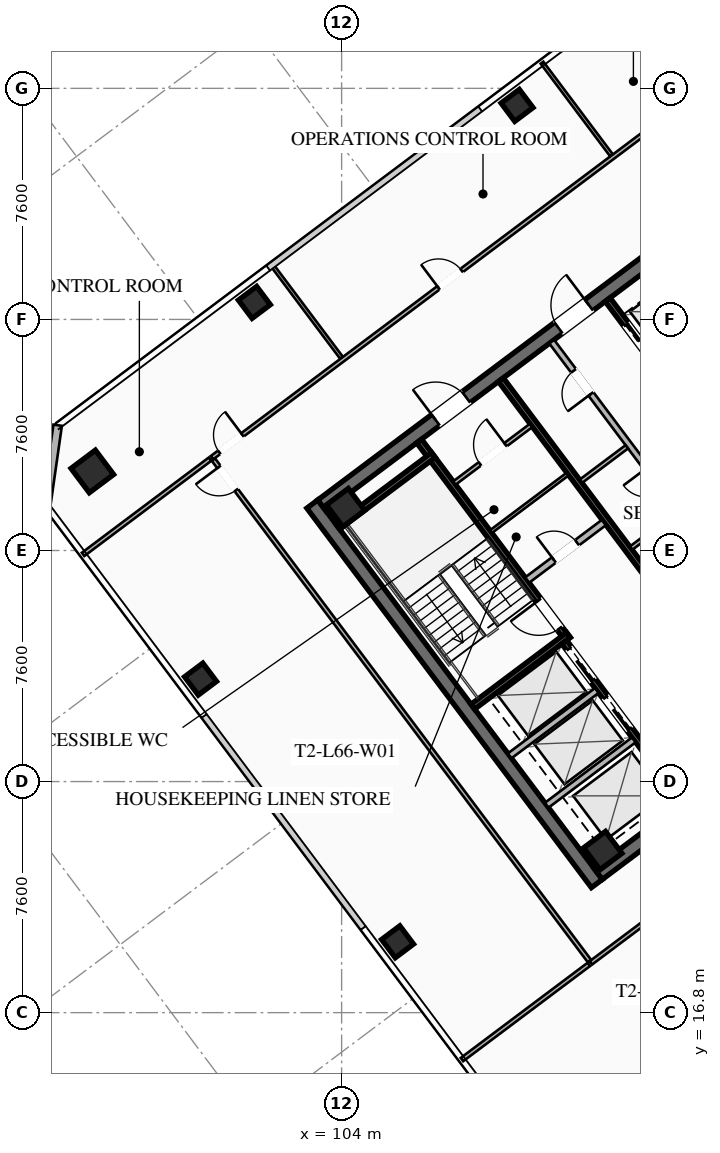
"""IFC4 building model, lengths in metres.
Left out: names, types, materials, properties, quantities, classifications, styles, units other than length and angle.
Written with IfcOpenShell. Run it as: python <this file> out.ifc"""

import sys

from ifc_helpers import new_model, si_unit, direction, frame, frame_2d, origin, origin_2d, place, context, subcontext, project, spatial, rectangle, hollow_rectangle, extrude, element, fill, save


model = new_model("IFC4")
c1 = context("Model", 3, precision=1e-05, world=origin(), true_north=direction((0.0, 1.0)))
c2 = subcontext(c1, "Body", "Model", "MODEL_VIEW")
j1 = project(units=[si_unit("LENGTHUNIT", "METRE"), si_unit("PLANEANGLEUNIT", "RADIAN")], contexts=[c1])
p1 = place(None, origin())
s1 = spatial("IfcSite", under=j1, at=p1, CompositionType="ELEMENT")
p2 = place(p1, origin())
s2 = spatial("IfcBuilding", under=s1, at=p2, CompositionType="ELEMENT")
p3 = place(p2, frame((0.0, 0.0, 243.25)))
s3 = spatial("IfcBuildingStorey", under=s2, at=p3, CompositionType="ELEMENT", Elevation=243.25)
p4 = place(p3, frame((112.396, 21.047, 0.0), z_axis=(0.0, 0.0, 1.0), x_axis=(-0.600005007985, 0.799996243986, 0.0)))
e1 = element("IfcWall", 1, at=p4, inside=s3, PredefinedType="SHEAR", context=c2, shape_type="SweptSolid", body=[
    extrude(rectangle(XDim=15.6, YDim=0.45, at=frame_2d((7.8, 0.0))), origin(), (0.0, 0.0, 1.0), 3.55),
])
p5 = place(p3, frame((124.649, 30.518, 0.0), z_axis=(0.0, 0.0, 1.0), x_axis=(-0.8, -0.6, 0.0)))
e2 = element("IfcWall", 2, at=p5, inside=s3, PredefinedType="SHEAR", context=c2, shape_type="SweptSolid", body=[
    extrude(rectangle(XDim=15.26, YDim=0.45, at=frame_2d((7.63, 0.0))), origin(), (0.0, 0.0, 1.0), 3.55),
])
p6 = place(p5, frame((9.33, 0.0, 0.0)))
e3 = element("IfcOpeningElement", 3, at=p6, cuts=e2, PredefinedType="OPENING", context=c2, shape_type="SweptSolid", body=[
    extrude(rectangle(XDim=1.25, YDim=2.25, at=frame_2d((0.625, 1.125))), frame((0.0, 0.235, 0.0), z_axis=(0.0, -1.0, 0.0), x_axis=(1.0, 0.0, 0.0)), (0.0, 0.0, 1.0), 0.47),
])
p7 = place(p5, frame((4.28, 0.0, 0.0)))
e4 = element("IfcOpeningElement", 4, at=p7, cuts=e2, PredefinedType="OPENING", context=c2, shape_type="SweptSolid", body=[
    extrude(rectangle(XDim=1.25, YDim=2.25, at=frame_2d((0.625, 1.125))), frame((0.0, 0.235, 0.0), z_axis=(0.0, -1.0, 0.0), x_axis=(1.0, 0.0, 0.0)), (0.0, 0.0, 1.0), 0.47),
])
p8 = place(p3, frame((103.351, 33.482, 0.0), z_axis=(0.0, 0.0, 1.0), x_axis=(0.8, 0.6, 0.0)))
e5 = element("IfcWall", 5, at=p8, inside=s3, PredefinedType="SHEAR", context=c2, shape_type="SweptSolid", body=[
    extrude(rectangle(XDim=15.26, YDim=0.45, at=frame_2d((7.63, 0.0))), origin(), (0.0, 0.0, 1.0), 3.55),
])
p9 = place(p8, frame((4.68, 0.0, 0.0)))
e6 = element("IfcOpeningElement", 6, at=p9, cuts=e5, PredefinedType="OPENING", context=c2, shape_type="SweptSolid", body=[
    extrude(rectangle(XDim=1.25, YDim=2.25, at=frame_2d((0.625, 1.125))), frame((0.0, 0.235, 0.0), z_axis=(0.0, -1.0, 0.0), x_axis=(1.0, 0.0, 0.0)), (0.0, 0.0, 1.0), 0.47),
])
p10 = place(p8, frame((9.73, 0.0, 0.0)))
e7 = element("IfcOpeningElement", 7, at=p10, cuts=e5, PredefinedType="OPENING", context=c2, shape_type="SweptSolid", body=[
    extrude(rectangle(XDim=1.25, YDim=2.25, at=frame_2d((0.625, 1.125))), frame((0.0, 0.235, 0.0), z_axis=(0.0, -1.0, 0.0), x_axis=(1.0, 0.0, 0.0)), (0.0, 0.0, 1.0), 0.47),
])
for number, where, z_axis, x_axis in (
    (8, (112.59, 22.13, 0.0), (0.0, 0.0, 1.0), (0.8, 0.6, 0.0)),
    (9, (104.13, 33.41, 0.0), (0.0, 0.0, 1.0), (0.8, 0.6, 0.0)),
):
    element("IfcColumn", number, at=place(p3, frame(where, z_axis=z_axis, x_axis=x_axis)), inside=s3, PredefinedType="COLUMN", context=c2, shape_type="SweptSolid", body=[
        extrude(hollow_rectangle(XDim=0.9, YDim=0.9, WallThickness=0.04, at=origin_2d()), origin(), (0.0, 0.0, 1.0), 3.25),
    ])
p11 = place(p3, frame((95.8, 34.6, 0.0), z_axis=(0.0, 0.0, 1.0), x_axis=(0.799999996291, 0.600000004945, 0.0)))
e10 = element("IfcColumn", 10, at=p11, inside=s3, PredefinedType="COLUMN", context=c2, shape_type="SweptSolid", body=[
    extrude(hollow_rectangle(XDim=1.0, YDim=1.0, WallThickness=0.04, at=origin_2d()), origin(), (0.0, 0.0, 1.0), 3.25),
])
for number, where, z_axis, x_axis in (
    (11, (109.77, 46.64, 0.0), (0.0, 0.0, 1.0), (0.8, 0.6, 0.0)),
    (12, (101.13, 40.16, 0.0), (0.0, 0.0, 1.0), (0.8, 0.6, 0.0)),
    (13, (99.36, 27.77, 0.0), (0.0, 0.0, 1.0), (0.8, 0.6, 0.0)),
    (14, (105.84, 19.13, 0.0), (0.0, 0.0, 1.0), (0.8, 0.6, 0.0)),
):
    element("IfcColumn", number, at=place(p3, frame(where, z_axis=z_axis, x_axis=x_axis)), inside=s3, PredefinedType="COLUMN", context=c2, shape_type="SweptSolid", body=[
        extrude(hollow_rectangle(XDim=0.75, YDim=0.75, WallThickness=0.032, at=origin_2d()), origin(), (0.0, 0.0, 1.0), 3.25),
    ])
p12 = place(p3, frame((94.28, 33.46, 0.0), z_axis=(0.0, 0.0, 1.0), x_axis=(0.141370477216, 0.989956760759, 0.0)))
e15 = element("IfcWall", 15, at=p12, inside=s3, PredefinedType="SOLIDWALL", context=c2, shape_type="SweptSolid", body=[
    extrude(rectangle(XDim=2.687, YDim=0.28, at=frame_2d((1.344, 0.0))), origin(), (0.0, 0.0, 1.0), 3.25),
])
p13 = place(p3, frame((111.44, 29.08, 0.0), z_axis=(0.0, 0.0, 1.0), x_axis=(-0.59999041401, 0.800007189403, 0.0)))
e16 = element("IfcWall", 16, at=p13, inside=s3, PredefinedType="SHEAR", context=c2, shape_type="SweptSolid", body=[
    extrude(rectangle(XDim=8.15, YDim=0.2, at=frame_2d((4.075, 0.0))), origin(), (0.0, 0.0, 1.0), 3.25),
])
p14 = place(p13, frame((0.45, 0.0, 0.0)))
e17 = element("IfcOpeningElement", 17, at=p14, cuts=e16, PredefinedType="OPENING", context=c2, shape_type="SweptSolid", body=[
    extrude(rectangle(XDim=1.15, YDim=2.2, at=frame_2d((0.575, 1.1))), frame((0.0, 0.11, 0.0), z_axis=(0.0, -1.0, 0.0), x_axis=(1.0, 0.0, 0.0)), (0.0, 0.0, 1.0), 0.22),
])
for number, where, z_axis, x_axis in (
    (18, (108.316, 26.862, 0.0), (0.0, 0.0, 1.0), (0.8, 0.6, 0.0)),
    (19, (103.876, 32.782, 0.0), (0.0, 0.0, 1.0), (0.8, 0.6, 0.0)),
):
    element("IfcWall", number, at=place(p3, frame(where, z_axis=z_axis, x_axis=x_axis)), inside=s3, PredefinedType="SHEAR", context=c2, shape_type="SweptSolid", body=[
        extrude(rectangle(XDim=3.93, YDim=0.2, at=frame_2d((1.965, 0.0))), origin(), (0.0, 0.0, 1.0), 3.25),
    ])
p15 = place(p3, frame((118.058, 25.856, 0.0), z_axis=(0.0, 0.0, 1.0), x_axis=(-0.600002657301, 0.799998007018, 0.0)))
e20 = element("IfcWall", 20, at=p15, inside=s3, PredefinedType="SHEAR", context=c2, shape_type="SweptSolid", body=[
    extrude(rectangle(XDim=14.7, YDim=0.2, at=frame_2d((7.35, 0.0))), origin(), (0.0, 0.0, 1.0), 3.25),
])
p16 = place(p3, frame((110.104, 31.028, 0.0), z_axis=(0.0, 0.0, 1.0), x_axis=(0.800018601094, 0.59997519774, 0.0)))
e21 = element("IfcWall", 21, at=p16, inside=s3, PredefinedType="SOLIDWALL", context=c2, shape_type="SweptSolid", body=[
    extrude(rectangle(XDim=3.15, YDim=0.22, at=frame_2d((1.575, 0.0))), origin(), (0.0, 0.0, 1.0), 2.393),
])
p17 = place(p16, frame((1.1, 0.0, 0.0)))
e22 = element("IfcOpeningElement", 22, at=p17, cuts=e21, PredefinedType="OPENING", context=c2, shape_type="SweptSolid", body=[
    extrude(rectangle(XDim=0.95, YDim=2.05, at=frame_2d((0.475, 1.025))), frame((0.0, 0.12, 0.0), z_axis=(0.0, -1.0, 0.0), x_axis=(1.0, 0.0, 0.0)), (0.0, 0.0, 1.0), 0.24),
])
p18 = place(p3, frame((115.25, 23.75, 0.0), z_axis=(0.0, 0.0, 1.0), x_axis=(-0.599994036198, 0.800004472816, 0.0)))
e23 = element("IfcWall", 23, at=p18, inside=s3, PredefinedType="SHEAR", context=c2, shape_type="SweptSolid", body=[
    extrude(rectangle(XDim=6.55, YDim=0.2, at=frame_2d((3.275, 0.0))), origin(), (0.0, 0.0, 1.0), 3.25),
])
p19 = place(p18, frame((4.975, 0.0, 0.0)))
e24 = element("IfcOpeningElement", 24, at=p19, cuts=e23, PredefinedType="OPENING", context=c2, shape_type="SweptSolid", body=[
    extrude(rectangle(XDim=1.3, YDim=2.25, at=frame_2d((0.65, 1.125))), frame((0.0, 0.11, 0.0), z_axis=(0.0, -1.0, 0.0), x_axis=(1.0, 0.0, 0.0)), (0.0, 0.0, 1.0), 0.22),
])
p20 = place(p18, frame((2.975, 0.0, 0.0)))
e25 = element("IfcOpeningElement", 25, at=p20, cuts=e23, PredefinedType="OPENING", context=c2, shape_type="SweptSolid", body=[
    extrude(rectangle(XDim=1.3, YDim=2.25, at=frame_2d((0.65, 1.125))), frame((0.0, 0.11, 0.0), z_axis=(0.0, -1.0, 0.0), x_axis=(1.0, 0.0, 0.0)), (0.0, 0.0, 1.0), 0.22),
])
p21 = place(p18, frame((0.775, 0.0, 0.0)))
e26 = element("IfcOpeningElement", 26, at=p21, cuts=e23, PredefinedType="OPENING", context=c2, shape_type="SweptSolid", body=[
    extrude(rectangle(XDim=1.3, YDim=2.25, at=frame_2d((0.65, 1.125))), frame((0.0, 0.11, 0.0), z_axis=(0.0, -1.0, 0.0), x_axis=(1.0, 0.0, 0.0)), (0.0, 0.0, 1.0), 0.22),
])
for number, where, z_axis, x_axis in (
    (27, (110.746, 23.622, 0.0), (0.0, 0.0, 1.0), (0.8, 0.6, 0.0)),
    (28, (109.528, 25.246, 0.0), (0.0, 0.0, 1.0), (0.8, 0.6, 0.0)),
):
    element("IfcWall", number, at=place(p3, frame(where, z_axis=z_axis, x_axis=x_axis)), inside=s3, PredefinedType="SOLIDWALL", context=c2, shape_type="SweptSolid", body=[
        extrude(rectangle(XDim=3.58, YDim=0.2, at=frame_2d((1.79, 0.0))), origin(), (0.0, 0.0, 1.0), 3.25),
    ])
p22 = place(p3, frame((112.75, 40.25, 0.0), z_axis=(0.0, 0.0, 1.0), x_axis=(0.599994036198, -0.800004472816, 0.0)))
e29 = element("IfcWall", 29, at=p22, inside=s3, PredefinedType="SHEAR", context=c2, shape_type="SweptSolid", body=[
    extrude(rectangle(XDim=6.55, YDim=0.2, at=frame_2d((3.275, 0.0))), origin(), (0.0, 0.0, 1.0), 3.25),
])
p23 = place(p22, frame((5.075, 0.0, 0.0)))
e30 = element("IfcOpeningElement", 30, at=p23, cuts=e29, PredefinedType="OPENING", context=c2, shape_type="SweptSolid", body=[
    extrude(rectangle(XDim=1.1, YDim=2.2, at=frame_2d((0.55, 1.1))), frame((0.0, 0.11, 0.0), z_axis=(0.0, -1.0, 0.0), x_axis=(1.0, 0.0, 0.0)), (0.0, 0.0, 1.0), 0.22),
])
p24 = place(p22, frame((3.025, 0.0, 0.0)))
e31 = element("IfcOpeningElement", 31, at=p24, cuts=e29, PredefinedType="OPENING", context=c2, shape_type="SweptSolid", body=[
    extrude(rectangle(XDim=1.1, YDim=2.2, at=frame_2d((0.55, 1.1))), frame((0.0, 0.11, 0.0), z_axis=(0.0, -1.0, 0.0), x_axis=(1.0, 0.0, 0.0)), (0.0, 0.0, 1.0), 0.22),
])
p25 = place(p22, frame((1.025, 0.0, 0.0)))
e32 = element("IfcOpeningElement", 32, at=p25, cuts=e29, PredefinedType="OPENING", context=c2, shape_type="SweptSolid", body=[
    extrude(rectangle(XDim=1.1, YDim=2.2, at=frame_2d((0.55, 1.1))), frame((0.0, 0.11, 0.0), z_axis=(0.0, -1.0, 0.0), x_axis=(1.0, 0.0, 0.0)), (0.0, 0.0, 1.0), 0.22),
])
p26 = place(p3, frame((107.71, 34.22, 0.0), z_axis=(0.0, 0.0, 1.0), x_axis=(0.799981399002, 0.60002480053, 0.0)))
e33 = element("IfcWall", 33, at=p26, inside=s3, PredefinedType="PARTITIONING", context=c2, shape_type="SweptSolid", body=[
    extrude(rectangle(XDim=3.15, YDim=0.135, at=frame_2d((1.575, 0.0))), origin(), (0.0, 0.0, 1.0), 2.393),
])
p27 = place(p26, frame((1.05, 0.0, 0.0)))
e34 = element("IfcOpeningElement", 34, at=p27, cuts=e33, PredefinedType="OPENING", context=c2, shape_type="SweptSolid", body=[
    extrude(rectangle(XDim=1.05, YDim=2.2, at=frame_2d((0.525, 1.1))), frame((0.0, 0.077, 0.0), z_axis=(0.0, -1.0, 0.0), x_axis=(1.0, 0.0, 0.0)), (0.0, 0.0, 1.0), 0.155),
])
p28 = place(p3, frame((108.91, 32.62, 0.0), z_axis=(0.0, 0.0, 1.0), x_axis=(0.800018601094, 0.59997519774, 0.0)))
e35 = element("IfcWall", 35, at=p28, inside=s3, PredefinedType="PARTITIONING", context=c2, shape_type="SweptSolid", body=[
    extrude(rectangle(XDim=3.15, YDim=0.11, at=frame_2d((1.575, 0.0))), origin(), (0.0, 0.0, 1.0), 2.393),
])
p29 = place(p3, frame((115.11, 33.27, 0.0), z_axis=(0.0, 0.0, 1.0), x_axis=(-0.600011160345, 0.79999162962, 0.0)))
e36 = element("IfcWall", 36, at=p29, inside=s3, PredefinedType="SOLIDWALL", context=c2, shape_type="SweptSolid", body=[
    extrude(rectangle(XDim=7.0, YDim=0.2, at=frame_2d((3.5, 0.0))), origin(), (0.0, 0.0, 1.0), 2.393),
])
p30 = place(p29, frame((0.85, 0.0, 0.0)))
e37 = element("IfcOpeningElement", 37, at=p30, cuts=e36, PredefinedType="OPENING", context=c2, shape_type="SweptSolid", body=[
    extrude(rectangle(XDim=0.95, YDim=2.05, at=frame_2d((0.475, 1.025))), frame((0.0, 0.11, 0.0), z_axis=(0.0, -1.0, 0.0), x_axis=(1.0, 0.0, 0.0)), (0.0, 0.0, 1.0), 0.22),
])
p31 = place(p29, frame((4.85, 0.0, 0.0)))
e38 = element("IfcOpeningElement", 38, at=p31, cuts=e36, PredefinedType="OPENING", context=c2, shape_type="SweptSolid", body=[
    extrude(rectangle(XDim=0.95, YDim=2.05, at=frame_2d((0.475, 1.025))), frame((0.0, 0.11, 0.0), z_axis=(0.0, -1.0, 0.0), x_axis=(1.0, 0.0, 0.0)), (0.0, 0.0, 1.0), 0.22),
])
p32 = place(p3, frame((113.526, 32.082, 0.0), z_axis=(0.0, 0.0, 1.0), x_axis=(0.800046745961, 0.599937666993, 0.0)))
e39 = element("IfcWall", 39, at=p32, inside=s3, PredefinedType="PARTITIONING", context=c2, shape_type="SweptSolid", body=[
    extrude(rectangle(XDim=1.88, YDim=0.135, at=frame_2d((0.94, 0.0))), origin(), (0.0, 0.0, 1.0), 2.393),
])
p33 = place(p3, frame((111.876, 34.282, 0.0), z_axis=(0.0, 0.0, 1.0), x_axis=(0.8, 0.6, 0.0)))
e40 = element("IfcWall", 40, at=p33, inside=s3, PredefinedType="PARTITIONING", context=c2, shape_type="SweptSolid", body=[
    extrude(rectangle(XDim=1.88, YDim=0.135, at=frame_2d((0.94, 0.0))), origin(), (0.0, 0.0, 1.0), 2.393),
])
p34 = place(p3, frame((99.736, 35.052, 0.0), z_axis=(0.0, 0.0, 1.0), x_axis=(0.799997387685, 0.600003483071, 0.0)))
e41 = element("IfcWall", 41, at=p34, inside=s3, PredefinedType="PARTITIONING", context=c2, shape_type="SweptSolid", body=[
    extrude(rectangle(XDim=22.43, YDim=0.135, at=frame_2d((11.215, 0.0))), origin(), (0.0, 0.0, 1.0), 2.393),
])
p35 = place(p34, frame((0.3, 0.0, 0.0)))
e42 = element("IfcOpeningElement", 42, at=p35, cuts=e41, PredefinedType="OPENING", context=c2, shape_type="SweptSolid", body=[
    extrude(rectangle(XDim=0.95, YDim=2.05, at=frame_2d((0.475, 1.025))), frame((0.0, 0.077, 0.0), z_axis=(0.0, -1.0, 0.0), x_axis=(1.0, 0.0, 0.0)), (0.0, 0.0, 1.0), 0.155),
])
p36 = place(p34, frame((9.313, 0.0, 0.0)))
e43 = element("IfcOpeningElement", 43, at=p36, cuts=e41, PredefinedType="OPENING", context=c2, shape_type="SweptSolid", body=[
    extrude(rectangle(XDim=0.95, YDim=2.05, at=frame_2d((0.475, 1.025))), frame((0.0, 0.077, 0.0), z_axis=(0.0, -1.0, 0.0), x_axis=(1.0, 0.0, 0.0)), (0.0, 0.0, 1.0), 0.155),
])
p37 = place(p34, frame((21.18, 0.0, 0.0)))
e44 = element("IfcOpeningElement", 44, at=p37, cuts=e41, PredefinedType="OPENING", context=c2, shape_type="SweptSolid", body=[
    extrude(rectangle(XDim=0.95, YDim=2.05, at=frame_2d((0.475, 1.025))), frame((0.0, 0.077, 0.0), z_axis=(0.0, -1.0, 0.0), x_axis=(1.0, 0.0, 0.0)), (0.0, 0.0, 1.0), 0.155),
])
for number, where, z_axis, x_axis in (
    (45, (103.992, 38.344, 0.0), (0.0, 0.0, 1.0), (-0.6, 0.8, 0.0)),
    (46, (112.872, 45.004, 0.0), (0.0, 0.0, 1.0), (-0.6, 0.8, 0.0)),
):
    element("IfcWall", number, at=place(p3, frame(where, z_axis=z_axis, x_axis=x_axis)), inside=s3, PredefinedType="PARTITIONING", context=c2, shape_type="SweptSolid", body=[
        extrude(rectangle(XDim=3.8, YDim=0.11, at=frame_2d((1.9, 0.0))), origin(), (0.0, 0.0, 1.0), 2.393),
    ])
p38 = place(p3, frame((123.382, 26.824, 0.0), z_axis=(0.0, 0.0, 1.0), x_axis=(-0.800004191227, -0.599994411657, 0.0)))
e47 = element("IfcWall", 47, at=p38, inside=s3, PredefinedType="PARTITIONING", context=c2, shape_type="SweptSolid", body=[
    extrude(rectangle(XDim=13.98, YDim=0.135, at=frame_2d((6.99, 0.0))), origin(), (0.0, 0.0, 1.0), 2.393),
])
p39 = place(p38, frame((7.701, 0.0, 0.0)))
e48 = element("IfcOpeningElement", 48, at=p39, cuts=e47, PredefinedType="OPENING", context=c2, shape_type="SweptSolid", body=[
    extrude(rectangle(XDim=0.95, YDim=2.05, at=frame_2d((0.475, 1.025))), frame((0.0, 0.077, 0.0), z_axis=(0.0, -1.0, 0.0), x_axis=(1.0, 0.0, 0.0)), (0.0, 0.0, 1.0), 0.155),
])
p40 = place(p38, frame((3.688, 0.0, 0.0)))
e49 = element("IfcOpeningElement", 49, at=p40, cuts=e47, PredefinedType="OPENING", context=c2, shape_type="SweptSolid", body=[
    extrude(rectangle(XDim=0.95, YDim=2.05, at=frame_2d((0.475, 1.025))), frame((0.0, 0.077, 0.0), z_axis=(0.0, -1.0, 0.0), x_axis=(1.0, 0.0, 0.0)), (0.0, 0.0, 1.0), 0.155),
])
p41 = place(p3, frame((112.15, 18.5, 0.0), z_axis=(0.0, 0.0, 1.0), x_axis=(-0.599998104681, 0.800001421485, 0.0)))
e50 = element("IfcWall", 50, at=p41, inside=s3, PredefinedType="PARTITIONING", context=c2, shape_type="SweptSolid", body=[
    extrude(rectangle(XDim=20.61, YDim=0.135, at=frame_2d((10.305, 0.0))), origin(), (0.0, 0.0, 1.0), 2.393),
])
p42 = place(p41, frame((19.36, 0.0, 0.0)))
e51 = element("IfcOpeningElement", 51, at=p42, cuts=e50, PredefinedType="OPENING", context=c2, shape_type="SweptSolid", body=[
    extrude(rectangle(XDim=0.95, YDim=2.05, at=frame_2d((0.475, 1.025))), frame((0.0, 0.077, 0.0), z_axis=(0.0, -1.0, 0.0), x_axis=(1.0, 0.0, 0.0)), (0.0, 0.0, 1.0), 0.155),
])
for number, where, z_axis, x_axis in (
    (52, (99.672, 35.004, 0.0), (0.0, 0.0, 1.0), (-0.8, -0.6, 0.0)),
    (53, (107.958, 15.256, 0.0), (0.0, 0.0, 1.0), (0.8, 0.6, 0.0)),
):
    element("IfcWall", number, at=place(p3, frame(where, z_axis=z_axis, x_axis=x_axis)), inside=s3, PredefinedType="PARTITIONING", context=c2, shape_type="SweptSolid", body=[
        extrude(rectangle(XDim=5.22, YDim=0.135, at=frame_2d((2.61, 0.0))), origin(), (0.0, 0.0, 1.0), 2.393),
    ])
p43 = place(p9, origin())
e54 = element("IfcDoor", 54, at=p43, inside=s3, OperationType="SINGLE_SWING_LEFT", PredefinedType="DOOR", context=c2, shape_type="SweptSolid", body=[
    extrude(rectangle(XDim=1.25, YDim=2.25, at=frame_2d((0.625, 1.125))), frame((0.0, 0.025, 0.0), z_axis=(0.0, -1.0, 0.0), x_axis=(1.0, 0.0, 0.0)), (0.0, 0.0, 1.0), 0.05),
])
fill(e6, e54)
p44 = place(p10, origin())
e55 = element("IfcDoor", 55, at=p44, inside=s3, OperationType="SINGLE_SWING_RIGHT", PredefinedType="DOOR", context=c2, shape_type="SweptSolid", body=[
    extrude(rectangle(XDim=1.25, YDim=2.25, at=frame_2d((0.625, 1.125))), frame((0.0, 0.025, 0.0), z_axis=(0.0, -1.0, 0.0), x_axis=(1.0, 0.0, 0.0)), (0.0, 0.0, 1.0), 0.05),
])
fill(e7, e55)
p45 = place(p14, origin())
e56 = element("IfcDoor", 56, at=p45, inside=s3, OperationType="SINGLE_SWING_RIGHT", PredefinedType="DOOR", context=c2, shape_type="SweptSolid", body=[
    extrude(rectangle(XDim=1.15, YDim=2.2, at=frame_2d((0.575, 1.1))), frame((0.0, 0.025, 0.0), z_axis=(0.0, -1.0, 0.0), x_axis=(1.0, 0.0, 0.0)), (0.0, 0.0, 1.0), 0.05),
])
fill(e17, e56)
p46 = place(p27, origin())
e57 = element("IfcDoor", 57, at=p46, inside=s3, OperationType="SINGLE_SWING_RIGHT", PredefinedType="DOOR", context=c2, shape_type="SweptSolid", body=[
    extrude(rectangle(XDim=1.05, YDim=2.2, at=frame_2d((0.525, 1.1))), frame((0.0, 0.025, 0.0), z_axis=(0.0, -1.0, 0.0), x_axis=(1.0, 0.0, 0.0)), (0.0, 0.0, 1.0), 0.05),
])
fill(e34, e57)
p47 = place(p17, origin())
e58 = element("IfcDoor", 58, at=p47, inside=s3, OperationType="SINGLE_SWING_LEFT", PredefinedType="DOOR", context=c2, shape_type="SweptSolid", body=[
    extrude(rectangle(XDim=0.95, YDim=2.05, at=frame_2d((0.475, 1.025))), frame((0.0, 0.025, 0.0), z_axis=(0.0, -1.0, 0.0), x_axis=(1.0, 0.0, 0.0)), (0.0, 0.0, 1.0), 0.05),
])
fill(e22, e58)
p48 = place(p31, origin())
e59 = element("IfcDoor", 59, at=p48, inside=s3, OperationType="SINGLE_SWING_LEFT", PredefinedType="DOOR", context=c2, shape_type="SweptSolid", body=[
    extrude(rectangle(XDim=0.95, YDim=2.05, at=frame_2d((0.475, 1.025))), frame((0.0, 0.025, 0.0), z_axis=(0.0, -1.0, 0.0), x_axis=(1.0, 0.0, 0.0)), (0.0, 0.0, 1.0), 0.05),
])
fill(e38, e59)
p49 = place(p35, origin())
e60 = element("IfcDoor", 60, at=p49, inside=s3, OperationType="SINGLE_SWING_RIGHT", PredefinedType="DOOR", context=c2, shape_type="SweptSolid", body=[
    extrude(rectangle(XDim=0.95, YDim=2.05, at=frame_2d((0.475, 1.025))), frame((0.0, 0.025, 0.0), z_axis=(0.0, -1.0, 0.0), x_axis=(1.0, 0.0, 0.0)), (0.0, 0.0, 1.0), 0.05),
])
fill(e42, e60)
p50 = place(p36, origin())
e61 = element("IfcDoor", 61, at=p50, inside=s3, OperationType="SINGLE_SWING_LEFT", PredefinedType="DOOR", context=c2, shape_type="SweptSolid", body=[
    extrude(rectangle(XDim=0.95, YDim=2.05, at=frame_2d((0.475, 1.025))), frame((0.0, 0.025, 0.0), z_axis=(0.0, -1.0, 0.0), x_axis=(1.0, 0.0, 0.0)), (0.0, 0.0, 1.0), 0.05),
])
fill(e43, e61)
p51 = place(p42, origin())
e62 = element("IfcDoor", 62, at=p51, inside=s3, OperationType="SINGLE_SWING_RIGHT", PredefinedType="DOOR", context=c2, shape_type="SweptSolid", body=[
    extrude(rectangle(XDim=0.95, YDim=2.05, at=frame_2d((0.475, 1.025))), frame((0.0, 0.025, 0.0), z_axis=(0.0, -1.0, 0.0), x_axis=(1.0, 0.0, 0.0)), (0.0, 0.0, 1.0), 0.05),
])
fill(e51, e62)
p52 = place(p19, origin())
e63 = element("IfcDoor", 63, at=p52, inside=s3, OperationType="SLIDING_TO_LEFT", PredefinedType="DOOR", context=c2, shape_type="SweptSolid", body=[
    extrude(rectangle(XDim=1.3, YDim=2.25, at=frame_2d((0.65, 1.125))), frame((0.0, 0.025, 0.0), z_axis=(0.0, -1.0, 0.0), x_axis=(1.0, 0.0, 0.0)), (0.0, 0.0, 1.0), 0.05),
])
fill(e24, e63)
p53 = place(p20, origin())
e64 = element("IfcDoor", 64, at=p53, inside=s3, OperationType="SLIDING_TO_LEFT", PredefinedType="DOOR", context=c2, shape_type="SweptSolid", body=[
    extrude(rectangle(XDim=1.3, YDim=2.25, at=frame_2d((0.65, 1.125))), frame((0.0, 0.025, 0.0), z_axis=(0.0, -1.0, 0.0), x_axis=(1.0, 0.0, 0.0)), (0.0, 0.0, 1.0), 0.05),
])
fill(e25, e64)
p54 = place(p25, origin())
e65 = element("IfcDoor", 65, at=p54, inside=s3, OperationType="SLIDING_TO_LEFT", PredefinedType="DOOR", context=c2, shape_type="SweptSolid", body=[
    extrude(rectangle(XDim=1.1, YDim=2.2, at=frame_2d((0.55, 1.1))), frame((0.0, 0.025, 0.0), z_axis=(0.0, -1.0, 0.0), x_axis=(1.0, 0.0, 0.0)), (0.0, 0.0, 1.0), 0.05),
])
fill(e32, e65)
save(model, sys.argv[1])
